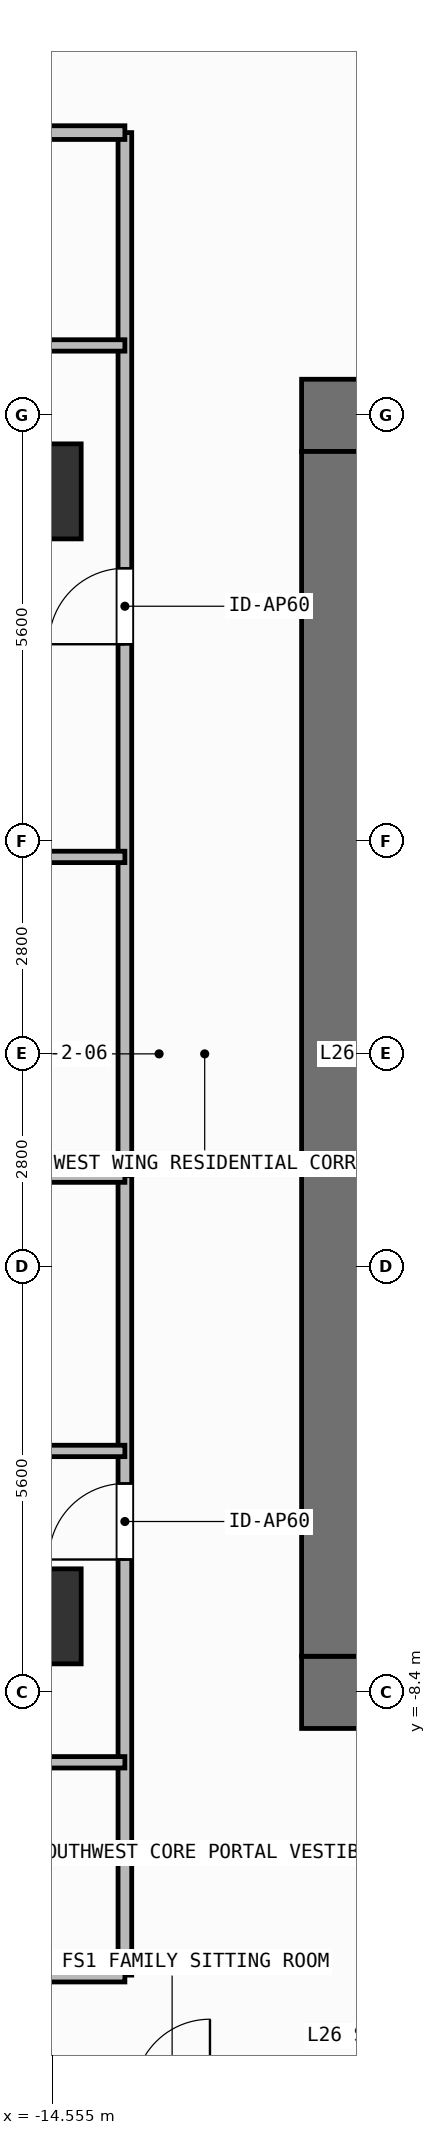
"""IFC4 building model, lengths in metres.
Left out: names, types, materials, properties, quantities, classifications, styles, units other than length and angle.
Written with IfcOpenShell. Run it as: python <this file> out.ifc"""

import sys

from ifc_helpers import new_model, si_unit, direction, frame, frame_2d, origin, origin_2d, place, context, subcontext, project, spatial, rectangle, extrude, element, fill, save


model = new_model("IFC4")
c1 = context("Model", 3, precision=1e-05, world=origin(), true_north=direction((0.0, 1.0)))
c2 = subcontext(c1, "Body", "Model", "MODEL_VIEW")
j1 = project(units=[si_unit("LENGTHUNIT", "METRE"), si_unit("PLANEANGLEUNIT", "RADIAN")], contexts=[c1])
p1 = place(None, origin())
s1 = spatial("IfcSite", under=j1, at=p1, CompositionType="ELEMENT")
p2 = place(p1, origin())
s2 = spatial("IfcBuilding", under=s1, at=p2, CompositionType="ELEMENT")
p3 = place(p2, frame((0.0, 0.0, 104.7)))
s3 = spatial("IfcBuildingStorey", under=s2, at=p3, CompositionType="ELEMENT", Elevation=104.7)
for number, where, z_axis, x_axis in (
    (1, (-11.275, -8.4, 0.0), (0.0, 0.0, 1.0), (1.0, 0.0, 0.0)),
    (2, (-11.275, 8.4, 0.0), (0.0, 0.0, 1.0), (1.0, 0.0, 0.0)),
):
    element("IfcWall", number, at=place(p3, frame(where, z_axis=z_axis, x_axis=x_axis)), inside=s3, PredefinedType="SHEAR", context=c2, shape_type="SweptSolid", body=[
        extrude(rectangle(XDim=1.575, YDim=0.95, at=frame_2d((0.788, 0.0))), origin(), (0.0, 0.0, 1.0), 3.9),
    ])
p4 = place(p3, frame((-10.8, -7.925, 0.0), z_axis=(0.0, 0.0, 1.0), x_axis=(0.0, 1.0, 0.0)))
e3 = element("IfcWall", 3, at=p4, inside=s3, PredefinedType="SHEAR", context=c2, shape_type="SweptSolid", body=[
    extrude(rectangle(XDim=15.85, YDim=0.95, at=frame_2d((7.925, 0.0))), origin(), (0.0, 0.0, 1.0), 3.9),
])
for number, where, z_axis, x_axis in (
    (4, (-14.8, -7.4, 0.0), (0.0, 0.0, 1.0), (1.0, 0.0, 0.0)),
    (5, (-14.8, 7.4, 0.0), (0.0, 0.0, 1.0), (1.0, 0.0, 0.0)),
):
    element("IfcColumn", number, at=place(p3, frame(where, z_axis=z_axis, x_axis=x_axis)), inside=s3, PredefinedType="COLUMN", context=c2, shape_type="SweptSolid", body=[
        extrude(rectangle(XDim=1.25, YDim=1.25, at=origin_2d()), origin(), (0.0, 0.0, 1.0), 3.9),
    ])
p5 = place(p3, frame((-13.6, -12.12, 0.0), z_axis=(0.0, 0.0, 1.0), x_axis=(0.0, 1.0, 0.0)))
e6 = element("IfcWall", 6, at=p5, inside=s3, PredefinedType="PARTITIONING", context=c2, shape_type="SweptSolid", body=[
    extrude(rectangle(XDim=10.52, YDim=0.18, at=frame_2d((5.26, 0.0))), origin(), (0.0, 0.0, 1.0), 3.62),
])
p6 = place(p5, frame((5.468, 0.0, 0.0)))
e7 = element("IfcOpeningElement", 7, at=p6, cuts=e6, PredefinedType="OPENING", context=c2, shape_type="SweptSolid", body=[
    extrude(rectangle(XDim=1.0, YDim=2.2, at=frame_2d((0.5, 1.1))), frame((0.0, 0.1, 0.0), z_axis=(0.0, -1.0, 0.0), x_axis=(1.0, 0.0, 0.0)), (0.0, 0.0, 1.0), 0.2),
])
p7 = place(p3, frame((-19.553, -5.224, 0.0), z_axis=(0.0, 0.0, 1.0), x_axis=(1.0, 0.0, 0.0)))
e8 = element("IfcWall", 8, at=p7, inside=s3, PredefinedType="PARTITIONING", context=c2, shape_type="SweptSolid", body=[
    extrude(rectangle(XDim=5.953, YDim=0.15, at=frame_2d((2.977, 0.0))), origin(), (0.0, 0.0, 1.0), 3.62),
])
p8 = place(p7, frame((2.64, 0.0, 0.0)))
e9 = element("IfcOpeningElement", 9, at=p8, cuts=e8, PredefinedType="OPENING", context=c2, shape_type="SweptSolid", body=[
    extrude(rectangle(XDim=0.85, YDim=2.1, at=frame_2d((0.425, 1.05))), frame((0.0, 0.085, 0.0), z_axis=(0.0, -1.0, 0.0), x_axis=(1.0, 0.0, 0.0)), (0.0, 0.0, 1.0), 0.17),
])
p9 = place(p3, frame((-23.69, -9.32, 0.0), z_axis=(0.0, 0.0, 1.0), x_axis=(1.0, 0.0, 0.0)))
e10 = element("IfcWall", 10, at=p9, inside=s3, PredefinedType="PARTITIONING", context=c2, shape_type="SweptSolid", body=[
    extrude(rectangle(XDim=10.09, YDim=0.15, at=frame_2d((5.045, 0.0))), origin(), (0.0, 0.0, 1.0), 3.62),
])
p10 = place(p9, frame((5.512, 0.0, 0.0)))
e11 = element("IfcOpeningElement", 11, at=p10, cuts=e10, PredefinedType="OPENING", context=c2, shape_type="SweptSolid", body=[
    extrude(rectangle(XDim=0.85, YDim=2.1, at=frame_2d((0.425, 1.05))), frame((0.0, 0.085, 0.0), z_axis=(0.0, -1.0, 0.0), x_axis=(1.0, 0.0, 0.0)), (0.0, 0.0, 1.0), 0.17),
])
p11 = place(p3, frame((-13.6, -1.6, 0.0), z_axis=(0.0, 0.0, 1.0), x_axis=(0.0, 1.0, 0.0)))
e12 = element("IfcWall", 12, at=p11, inside=s3, PredefinedType="PARTITIONING", context=c2, shape_type="SweptSolid", body=[
    extrude(rectangle(XDim=13.72, YDim=0.18, at=frame_2d((6.86, 0.0))), origin(), (0.0, 0.0, 1.0), 3.62),
])
p12 = place(p11, frame((6.989, 0.0, 0.0)))
e13 = element("IfcOpeningElement", 13, at=p12, cuts=e12, PredefinedType="OPENING", context=c2, shape_type="SweptSolid", body=[
    extrude(rectangle(XDim=1.0, YDim=2.2, at=frame_2d((0.5, 1.1))), frame((0.0, 0.1, 0.0), z_axis=(0.0, -1.0, 0.0), x_axis=(1.0, 0.0, 0.0)), (0.0, 0.0, 1.0), 0.2),
])
p13 = place(p3, frame((-19.553, 9.32, 0.0), z_axis=(0.0, 0.0, 1.0), x_axis=(1.0, 0.0, 0.0)))
e14 = element("IfcWall", 14, at=p13, inside=s3, PredefinedType="PARTITIONING", context=c2, shape_type="SweptSolid", body=[
    extrude(rectangle(XDim=5.953, YDim=0.15, at=frame_2d((2.977, 0.0))), origin(), (0.0, 0.0, 1.0), 3.62),
])
p14 = place(p13, frame((2.64, 0.0, 0.0)))
e15 = element("IfcOpeningElement", 15, at=p14, cuts=e14, PredefinedType="OPENING", context=c2, shape_type="SweptSolid", body=[
    extrude(rectangle(XDim=0.85, YDim=2.1, at=frame_2d((0.425, 1.05))), frame((0.0, 0.085, 0.0), z_axis=(0.0, -1.0, 0.0), x_axis=(1.0, 0.0, 0.0)), (0.0, 0.0, 1.0), 0.17),
])
p15 = place(p3, frame((-23.69, 2.591, 0.0), z_axis=(0.0, 0.0, 1.0), x_axis=(1.0, 0.0, 0.0)))
e16 = element("IfcWall", 16, at=p15, inside=s3, PredefinedType="PARTITIONING", context=c2, shape_type="SweptSolid", body=[
    extrude(rectangle(XDim=10.09, YDim=0.15, at=frame_2d((5.045, 0.0))), origin(), (0.0, 0.0, 1.0), 3.62),
])
p16 = place(p15, frame((4.62, 0.0, 0.0)))
e17 = element("IfcOpeningElement", 17, at=p16, cuts=e16, PredefinedType="OPENING", context=c2, shape_type="SweptSolid", body=[
    extrude(rectangle(XDim=0.85, YDim=2.1, at=frame_2d((0.425, 1.05))), frame((0.0, 0.085, 0.0), z_axis=(0.0, -1.0, 0.0), x_axis=(1.0, 0.0, 0.0)), (0.0, 0.0, 1.0), 0.17),
])
for number, where, z_axis, x_axis in (
    (18, (-27.93, -1.6, 0.0), (0.0, 0.0, 1.0), (1.0, 0.0, 0.0)),
    (19, (-27.93, -12.12, 0.0), (0.0, 0.0, 1.0), (1.0, 0.0, 0.0)),
    (20, (-27.93, 12.12, 0.0), (0.0, 0.0, 1.0), (1.0, 0.0, 0.0)),
):
    element("IfcWall", number, at=place(p3, frame(where, z_axis=z_axis, x_axis=x_axis)), inside=s3, PredefinedType="PARTITIONING", context=c2, shape_type="SweptSolid", body=[
        extrude(rectangle(XDim=14.33, YDim=0.18, at=frame_2d((7.165, 0.0))), origin(), (0.0, 0.0, 1.0), 3.62),
    ])
p17 = place(p6, origin())
e21 = element("IfcDoor", 21, at=p17, inside=s3, OperationType="SINGLE_SWING_LEFT", PredefinedType="DOOR", context=c2, shape_type="SweptSolid", body=[
    extrude(rectangle(XDim=1.0, YDim=2.2, at=frame_2d((0.5, 1.1))), frame((0.0, 0.025, 0.0), z_axis=(0.0, -1.0, 0.0), x_axis=(1.0, 0.0, 0.0)), (0.0, 0.0, 1.0), 0.05),
])
fill(e7, e21)
p18 = place(p12, origin())
e22 = element("IfcDoor", 22, at=p18, inside=s3, OperationType="SINGLE_SWING_LEFT", PredefinedType="DOOR", context=c2, shape_type="SweptSolid", body=[
    extrude(rectangle(XDim=1.0, YDim=2.2, at=frame_2d((0.5, 1.1))), frame((0.0, 0.025, 0.0), z_axis=(0.0, -1.0, 0.0), x_axis=(1.0, 0.0, 0.0)), (0.0, 0.0, 1.0), 0.05),
])
fill(e13, e22)
save(model, sys.argv[1])
